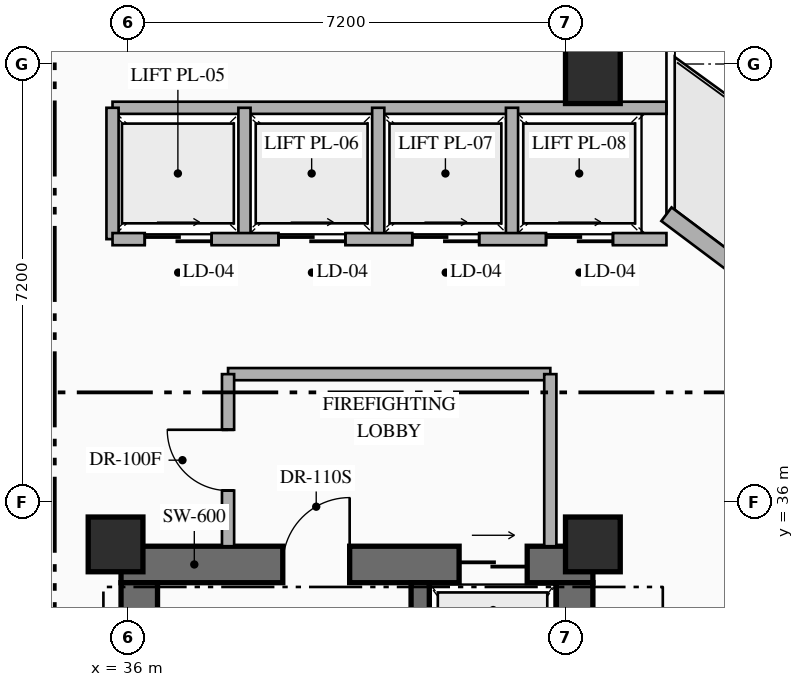
"""IFC4 building model, lengths in metres.
Left out: names, types, materials, properties, quantities, classifications, styles, units other than length and angle.
Written with IfcOpenShell. Run it as: python <this file> out.ifc"""

import sys

from ifc_helpers import new_model, si_unit, direction, frame, frame_2d, origin, origin_2d, place, context, subcontext, project, spatial, rectangle, extrude, element, fill, save


model = new_model("IFC4")
c1 = context("Model", 3, precision=1e-05, world=origin(), true_north=direction((0.0, 1.0)))
c2 = subcontext(c1, "Body", "Model", "MODEL_VIEW")
j1 = project(units=[si_unit("LENGTHUNIT", "METRE"), si_unit("PLANEANGLEUNIT", "RADIAN")], contexts=[c1])
p1 = place(None, origin())
s1 = spatial("IfcSite", under=j1, at=p1, CompositionType="ELEMENT")
p2 = place(p1, origin())
s2 = spatial("IfcBuilding", under=s1, at=p2, CompositionType="ELEMENT")
p3 = place(p2, frame((0.0, 0.0, 101.25)))
s3 = spatial("IfcBuildingStorey", under=s2, at=p3, CompositionType="ELEMENT", Elevation=101.25)
p4 = place(p3, frame((35.89, 34.97, 0.0), z_axis=(0.0, 0.0, 1.0), x_axis=(1.0, 0.0, 0.0)))
e1 = element("IfcWall", 1, at=p4, inside=s3, PredefinedType="SHEAR", context=c2, shape_type="SweptSolid", body=[
    extrude(rectangle(XDim=7.76, YDim=0.6, at=frame_2d((3.88, 0.0))), origin(), (0.0, 0.0, 1.0), 3.6),
])
p5 = place(p4, frame((2.66, 0.0, 0.0)))
e2 = element("IfcOpeningElement", 2, at=p5, cuts=e1, PredefinedType="OPENING", context=c2, shape_type="SweptSolid", body=[
    extrude(rectangle(XDim=1.1, YDim=2.2, at=frame_2d((0.55, 1.1))), frame((0.0, 0.31, 0.0), z_axis=(0.0, -1.0, 0.0), x_axis=(1.0, 0.0, 0.0)), (0.0, 0.0, 1.0), 0.62),
])
p6 = place(p4, frame((5.56, 0.0, 0.0)))
e3 = element("IfcOpeningElement", 3, at=p6, cuts=e1, PredefinedType="OPENING", context=c2, shape_type="SweptSolid", body=[
    extrude(rectangle(XDim=1.12, YDim=2.15, at=frame_2d((0.56, 1.075))), frame((0.0, 0.31, 0.0), z_axis=(0.0, -1.0, 0.0), x_axis=(1.0, 0.0, 0.0)), (0.0, 0.0, 1.0), 0.62),
])
p7 = place(p3, frame((36.19, 25.19, 0.0), z_axis=(0.0, 0.0, 1.0), x_axis=(0.0, 1.0, 0.0)))
e4 = element("IfcWall", 4, at=p7, inside=s3, PredefinedType="SHEAR", context=c2, shape_type="SweptSolid", body=[
    extrude(rectangle(XDim=9.48, YDim=0.6, at=frame_2d((4.74, 0.0))), origin(), (0.0, 0.0, 1.0), 3.6),
])
p8 = place(p3, frame((43.35, 25.19, 0.0), z_axis=(0.0, 0.0, 1.0), x_axis=(0.0, 1.0, 0.0)))
e5 = element("IfcWall", 5, at=p8, inside=s3, PredefinedType="SHEAR", context=c2, shape_type="SweptSolid", body=[
    extrude(rectangle(XDim=9.48, YDim=0.6, at=frame_2d((4.74, 0.0))), origin(), (0.0, 0.0, 1.0), 3.6),
])
p9 = place(p8, frame((1.21, 0.0, 0.0)))
e6 = element("IfcOpeningElement", 6, at=p9, cuts=e5, PredefinedType="OPENING", context=c2, shape_type="SweptSolid", body=[
    extrude(rectangle(XDim=0.85, YDim=2.08, at=frame_2d((0.425, 1.04))), frame((0.0, 0.31, 0.0), z_axis=(0.0, -1.0, 0.0), x_axis=(1.0, 0.0, 0.0)), (0.0, 0.0, 1.0), 0.62),
])
p10 = place(p8, frame((4.46, 0.0, 0.0)))
e7 = element("IfcOpeningElement", 7, at=p10, cuts=e5, PredefinedType="OPENING", context=c2, shape_type="SweptSolid", body=[
    extrude(rectangle(XDim=0.85, YDim=2.08, at=frame_2d((0.425, 1.04))), frame((0.0, 0.31, 0.0), z_axis=(0.0, -1.0, 0.0), x_axis=(1.0, 0.0, 0.0)), (0.0, 0.0, 1.0), 0.62),
])
p11 = place(p3, frame((40.81, 25.19, 0.0), z_axis=(0.0, 0.0, 1.0), x_axis=(0.0, 1.0, 0.0)))
e8 = element("IfcWall", 8, at=p11, inside=s3, PredefinedType="SHEAR", context=c2, shape_type="SweptSolid", body=[
    extrude(rectangle(XDim=9.48, YDim=0.3, at=frame_2d((4.74, 0.0))), origin(), (0.0, 0.0, 1.0), 3.6),
])
for number, where, z_axis, x_axis in (
    (9, (35.8, 35.3, 0.0), (0.0, 0.0, 1.0), (1.0, 0.0, 0.0)),
    (10, (43.65, 35.3, 0.0), (0.0, 0.0, 1.0), (1.0, 0.0, 0.0)),
    (11, (43.65, 43.0, 0.0), (0.0, 0.0, 1.0), (1.0, 0.0, 0.0)),
):
    element("IfcColumn", number, at=place(p3, frame(where, z_axis=z_axis, x_axis=x_axis)), inside=s3, PredefinedType="COLUMN", context=c2, shape_type="SweptSolid", body=[
        extrude(rectangle(XDim=0.9, YDim=0.9, at=origin_2d()), origin(), (0.0, 0.0, 1.0), 3.6),
    ])
p12 = place(p3, frame((44.86, 40.73, 0.0), z_axis=(0.0, 0.0, 1.0), x_axis=(0.800006902154, -0.599990797017, 0.0)))
e12 = element("IfcWall", 12, at=p12, inside=s3, PredefinedType="STANDARD", context=c2, shape_type="SweptSolid", body=[
    extrude(rectangle(XDim=29.712, YDim=0.28, at=frame_2d((14.856, 0.0))), origin(), (0.0, 0.0, 1.0), 3.35),
])
p13 = place(p12, frame((14.249, 0.0, 0.0)))
e13 = element("IfcOpeningElement", 13, at=p13, cuts=e12, PredefinedType="OPENING", context=c2, shape_type="SweptSolid", body=[
    extrude(rectangle(XDim=1.1, YDim=2.2, at=frame_2d((0.55, 1.1))), frame((0.0, 0.15, 0.0), z_axis=(0.0, -1.0, 0.0), x_axis=(1.0, 0.0, 0.0)), (0.0, 0.0, 1.0), 0.3),
])
p14 = place(p12, frame((6.528, 0.0, 0.85)))
e14 = element("IfcOpeningElement", 14, at=p14, cuts=e12, PredefinedType="OPENING", context=c2, shape_type="SweptSolid", body=[
    extrude(rectangle(XDim=1.8, YDim=2.1, at=frame_2d((0.9, 1.05))), frame((0.0, 0.15, 0.0), z_axis=(0.0, -1.0, 0.0), x_axis=(1.0, 0.0, 0.0)), (0.0, 0.0, 1.0), 0.3),
])
p15 = place(p12, frame((21.384, 0.0, 0.85)))
e15 = element("IfcOpeningElement", 15, at=p15, cuts=e12, PredefinedType="OPENING", context=c2, shape_type="SweptSolid", body=[
    extrude(rectangle(XDim=1.8, YDim=2.1, at=frame_2d((0.9, 1.05))), frame((0.0, 0.15, 0.0), z_axis=(0.0, -1.0, 0.0), x_axis=(1.0, 0.0, 0.0)), (0.0, 0.0, 1.0), 0.3),
])
p16 = place(p3, frame((37.65, 38.1, 0.0), z_axis=(0.0, 0.0, 1.0), x_axis=(1.0, 0.0, 0.0)))
e16 = element("IfcWall", 16, at=p16, inside=s3, PredefinedType="STANDARD", context=c2, shape_type="SweptSolid", body=[
    extrude(rectangle(XDim=5.3, YDim=0.2, at=frame_2d((2.65, 0.0))), origin(), (0.0, 0.0, 1.0), 3.35),
])
p17 = place(p3, frame((42.95, 35.27, 0.0), z_axis=(0.0, 0.0, 1.0), x_axis=(0.0, 1.0, 0.0)))
e17 = element("IfcWall", 17, at=p17, inside=s3, PredefinedType="STANDARD", context=c2, shape_type="SweptSolid", body=[
    extrude(rectangle(XDim=2.83, YDim=0.2, at=frame_2d((1.415, 0.0))), origin(), (0.0, 0.0, 1.0), 3.35),
])
p18 = place(p3, frame((37.65, 35.27, 0.0), z_axis=(0.0, 0.0, 1.0), x_axis=(0.0, 1.0, 0.0)))
e18 = element("IfcWall", 18, at=p18, inside=s3, PredefinedType="STANDARD", context=c2, shape_type="SweptSolid", body=[
    extrude(rectangle(XDim=2.83, YDim=0.2, at=frame_2d((1.415, 0.0))), origin(), (0.0, 0.0, 1.0), 3.35),
])
p19 = place(p18, frame((0.915, 0.0, 0.0)))
e19 = element("IfcOpeningElement", 19, at=p19, cuts=e18, PredefinedType="OPENING", context=c2, shape_type="SweptSolid", body=[
    extrude(rectangle(XDim=1.0, YDim=2.2, at=frame_2d((0.5, 1.1))), frame((0.0, 0.11, 0.0), z_axis=(0.0, -1.0, 0.0), x_axis=(1.0, 0.0, 0.0)), (0.0, 0.0, 1.0), 0.22),
])
p20 = place(p3, frame((35.75, 42.48, 0.0), z_axis=(0.0, 0.0, 1.0), x_axis=(1.0, 0.0, 0.0)))
e20 = element("IfcWall", 20, at=p20, inside=s3, PredefinedType="STANDARD", context=c2, shape_type="SweptSolid", body=[
    extrude(rectangle(XDim=9.11, YDim=0.2, at=frame_2d((4.555, 0.0))), origin(), (0.0, 0.0, 1.0), 3.35),
])
for number, where, z_axis, x_axis in (
    (21, (35.75, 40.32, 0.0), (0.0, 0.0, 1.0), (0.0, 1.0, 0.0)),
    (22, (37.92, 40.32, 0.0), (0.0, 0.0, 1.0), (0.0, 1.0, 0.0)),
    (23, (40.12, 40.32, 0.0), (0.0, 0.0, 1.0), (0.0, 1.0, 0.0)),
    (24, (42.32, 40.32, 0.0), (0.0, 0.0, 1.0), (0.0, 1.0, 0.0)),
):
    element("IfcWall", number, at=place(p3, frame(where, z_axis=z_axis, x_axis=x_axis)), inside=s3, PredefinedType="STANDARD", context=c2, shape_type="SweptSolid", body=[
        extrude(rectangle(XDim=2.16, YDim=0.2, at=frame_2d((1.08, 0.0))), origin(), (0.0, 0.0, 1.0), 3.35),
    ])
p21 = place(p3, frame((35.75, 40.32, 0.0), z_axis=(0.0, 0.0, 1.0), x_axis=(1.0, 0.0, 0.0)))
e25 = element("IfcWall", 25, at=p21, inside=s3, PredefinedType="STANDARD", context=c2, shape_type="SweptSolid", body=[
    extrude(rectangle(XDim=9.11, YDim=0.2, at=frame_2d((4.555, 0.0))), origin(), (0.0, 0.0, 1.0), 3.35),
])
p22 = place(p21, frame((0.53, 0.0, 0.0)))
e26 = element("IfcOpeningElement", 26, at=p22, cuts=e25, PredefinedType="OPENING", context=c2, shape_type="SweptSolid", body=[
    extrude(rectangle(XDim=1.1, YDim=2.18, at=frame_2d((0.55, 1.09))), frame((0.0, 0.11, 0.0), z_axis=(0.0, -1.0, 0.0), x_axis=(1.0, 0.0, 0.0)), (0.0, 0.0, 1.0), 0.22),
])
p23 = place(p21, frame((2.73, 0.0, 0.0)))
e27 = element("IfcOpeningElement", 27, at=p23, cuts=e25, PredefinedType="OPENING", context=c2, shape_type="SweptSolid", body=[
    extrude(rectangle(XDim=1.1, YDim=2.18, at=frame_2d((0.55, 1.09))), frame((0.0, 0.11, 0.0), z_axis=(0.0, -1.0, 0.0), x_axis=(1.0, 0.0, 0.0)), (0.0, 0.0, 1.0), 0.22),
])
p24 = place(p21, frame((4.93, 0.0, 0.0)))
e28 = element("IfcOpeningElement", 28, at=p24, cuts=e25, PredefinedType="OPENING", context=c2, shape_type="SweptSolid", body=[
    extrude(rectangle(XDim=1.1, YDim=2.18, at=frame_2d((0.55, 1.09))), frame((0.0, 0.11, 0.0), z_axis=(0.0, -1.0, 0.0), x_axis=(1.0, 0.0, 0.0)), (0.0, 0.0, 1.0), 0.22),
])
p25 = place(p21, frame((7.13, 0.0, 0.0)))
e29 = element("IfcOpeningElement", 29, at=p25, cuts=e25, PredefinedType="OPENING", context=c2, shape_type="SweptSolid", body=[
    extrude(rectangle(XDim=1.1, YDim=2.18, at=frame_2d((0.55, 1.09))), frame((0.0, 0.11, 0.0), z_axis=(0.0, -1.0, 0.0), x_axis=(1.0, 0.0, 0.0)), (0.0, 0.0, 1.0), 0.22),
])
p26 = place(p5, origin())
e30 = element("IfcDoor", 30, at=p26, inside=s3, OperationType="SINGLE_SWING_RIGHT", PredefinedType="DOOR", context=c2, shape_type="SweptSolid", body=[
    extrude(rectangle(XDim=1.1, YDim=2.2, at=frame_2d((0.55, 1.1))), frame((0.0, 0.025, 0.0), z_axis=(0.0, -1.0, 0.0), x_axis=(1.0, 0.0, 0.0)), (0.0, 0.0, 1.0), 0.05),
])
fill(e2, e30)
p27 = place(p6, origin())
e31 = element("IfcDoor", 31, at=p27, inside=s3, OperationType="SLIDING_TO_RIGHT", PredefinedType="USERDEFINED", context=c2, shape_type="SweptSolid", body=[
    extrude(rectangle(XDim=1.12, YDim=2.15, at=frame_2d((0.56, 1.075))), frame((0.0, 0.025, 0.0), z_axis=(0.0, -1.0, 0.0), x_axis=(1.0, 0.0, 0.0)), (0.0, 0.0, 1.0), 0.05),
])
fill(e3, e31)
p28 = place(p19, origin())
e32 = element("IfcDoor", 32, at=p28, inside=s3, OperationType="SINGLE_SWING_RIGHT", PredefinedType="DOOR", context=c2, shape_type="SweptSolid", body=[
    extrude(rectangle(XDim=1.0, YDim=2.2, at=frame_2d((0.5, 1.1))), frame((0.0, 0.025, 0.0), z_axis=(0.0, -1.0, 0.0), x_axis=(1.0, 0.0, 0.0)), (0.0, 0.0, 1.0), 0.05),
])
fill(e19, e32)
p29 = place(p22, origin())
e33 = element("IfcDoor", 33, at=p29, inside=s3, OperationType="SLIDING_TO_RIGHT", PredefinedType="USERDEFINED", context=c2, shape_type="SweptSolid", body=[
    extrude(rectangle(XDim=1.1, YDim=2.18, at=frame_2d((0.55, 1.09))), frame((0.0, 0.025, 0.0), z_axis=(0.0, -1.0, 0.0), x_axis=(1.0, 0.0, 0.0)), (0.0, 0.0, 1.0), 0.05),
])
fill(e26, e33)
p30 = place(p23, origin())
e34 = element("IfcDoor", 34, at=p30, inside=s3, OperationType="SLIDING_TO_RIGHT", PredefinedType="USERDEFINED", context=c2, shape_type="SweptSolid", body=[
    extrude(rectangle(XDim=1.1, YDim=2.18, at=frame_2d((0.55, 1.09))), frame((0.0, 0.025, 0.0), z_axis=(0.0, -1.0, 0.0), x_axis=(1.0, 0.0, 0.0)), (0.0, 0.0, 1.0), 0.05),
])
fill(e27, e34)
p31 = place(p24, origin())
e35 = element("IfcDoor", 35, at=p31, inside=s3, OperationType="SLIDING_TO_RIGHT", PredefinedType="USERDEFINED", context=c2, shape_type="SweptSolid", body=[
    extrude(rectangle(XDim=1.1, YDim=2.18, at=frame_2d((0.55, 1.09))), frame((0.0, 0.025, 0.0), z_axis=(0.0, -1.0, 0.0), x_axis=(1.0, 0.0, 0.0)), (0.0, 0.0, 1.0), 0.05),
])
fill(e28, e35)
p32 = place(p25, origin())
e36 = element("IfcDoor", 36, at=p32, inside=s3, OperationType="SLIDING_TO_RIGHT", PredefinedType="USERDEFINED", context=c2, shape_type="SweptSolid", body=[
    extrude(rectangle(XDim=1.1, YDim=2.18, at=frame_2d((0.55, 1.09))), frame((0.0, 0.025, 0.0), z_axis=(0.0, -1.0, 0.0), x_axis=(1.0, 0.0, 0.0)), (0.0, 0.0, 1.0), 0.05),
])
fill(e29, e36)
save(model, sys.argv[1])
